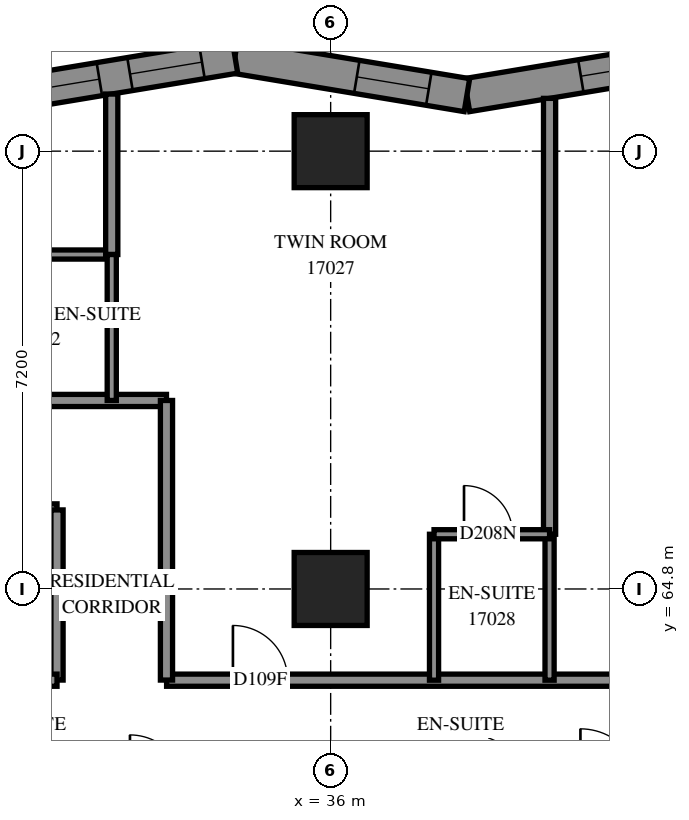
"""IFC4 building model, lengths in metres.
Left out: names, types, materials, properties, quantities, classifications, styles, units other than length and angle.
Written with IfcOpenShell. Run it as: python <this file> out.ifc"""

import sys

from ifc_helpers import new_model, si_unit, direction, frame, frame_2d, origin, origin_2d, place, context, subcontext, project, spatial, polyline, rectangle, outline, extrude, element, fill, save


model = new_model("IFC4")
c1 = context("Model", 3, precision=1e-05, world=origin(), true_north=direction((0.0, 1.0)))
c2 = subcontext(c1, "Body", "Model", "MODEL_VIEW")
j1 = project(units=[si_unit("LENGTHUNIT", "METRE"), si_unit("PLANEANGLEUNIT", "RADIAN")], contexts=[c1])
p1 = place(None, origin())
s1 = spatial("IfcSite", under=j1, at=p1, CompositionType="ELEMENT")
p2 = place(p1, origin())
s2 = spatial("IfcBuilding", under=s1, at=p2, CompositionType="ELEMENT")
p3 = place(p2, frame((0.0, 0.0, 64.4)))
s3 = spatial("IfcBuildingStorey", under=s2, at=p3, CompositionType="ELEMENT", Elevation=64.4)
for number, where, z_axis, x_axis in (
    (1, (36.0, 64.8, 0.0), (0.0, 0.0, 1.0), (1.0, 0.0, 0.0)),
    (2, (36.0, 72.0, 0.0), (0.0, 0.0, 1.0), (1.0, 0.0, 0.0)),
):
    element("IfcColumn", number, at=place(p3, frame(where, z_axis=z_axis, x_axis=x_axis)), inside=s3, PredefinedType="COLUMN", context=c2, shape_type="SweptSolid", body=[
        extrude(rectangle(XDim=1.2, YDim=1.2, at=origin_2d()), origin(), (0.0, 0.0, 1.0), 3.1),
    ])
p4 = place(p3, frame((42.056, 73.554, 0.0), z_axis=(0.0, 0.0, 1.0), x_axis=(-0.9865110911, -0.1636944324, 0.0)))
e3 = element("IfcWall", 3, at=p4, inside=s3, PredefinedType="SOLIDWALL", context=c2, shape_type="SweptSolid", body=[
    extrude(outline(polyline([(-0.046, -0.275), (3.821, -0.275), (3.913, 0.275), (0.046, 0.275), (-0.046, -0.275)])), origin(), (0.0, 0.0, 1.0), 3.1),
])
p5 = place(p4, frame((0.767, 0.0, 0.5)))
e4 = element("IfcOpeningElement", 4, at=p5, cuts=e3, PredefinedType="OPENING", context=c2, shape_type="SweptSolid", body=[
    extrude(rectangle(XDim=1.2, YDim=2.45, at=frame_2d((0.6, 1.225))), frame((0.0, 0.285, 0.0), z_axis=(0.0, -1.0, 0.0), x_axis=(1.0, 0.0, 0.0)), (0.0, 0.0, 1.0), 0.57),
])
p6 = place(p3, frame((38.241, 72.921, 0.0), z_axis=(0.0, 0.0, 1.0), x_axis=(-0.9865110911, 0.1636944324, 0.0)))
e5 = element("IfcWall", 5, at=p6, inside=s3, PredefinedType="SOLIDWALL", context=c2, shape_type="SweptSolid", body=[
    extrude(outline(polyline([(0.046, -0.275), (3.913, -0.275), (3.821, 0.275), (-0.046, 0.275), (0.046, -0.275)])), origin(), (0.0, 0.0, 1.0), 3.1),
])
p7 = place(p6, frame((0.636, 0.0, 0.5)))
e6 = element("IfcOpeningElement", 6, at=p7, cuts=e5, PredefinedType="OPENING", context=c2, shape_type="SweptSolid", body=[
    extrude(rectangle(XDim=1.2, YDim=2.45, at=frame_2d((0.6, 1.225))), frame((0.0, 0.285, 0.0), z_axis=(0.0, -1.0, 0.0), x_axis=(1.0, 0.0, 0.0)), (0.0, 0.0, 1.0), 0.57),
])
p8 = place(p3, frame((34.426, 73.554, 0.0), z_axis=(0.0, 0.0, 1.0), x_axis=(-0.9865103981, -0.1636986085, 0.0)))
e7 = element("IfcWall", 7, at=p8, inside=s3, PredefinedType="SOLIDWALL", context=c2, shape_type="SweptSolid", body=[
    extrude(outline(polyline([(-0.046, -0.275), (3.821, -0.275), (3.913, 0.275), (0.046, 0.275), (-0.046, -0.275)])), origin(), (0.0, 0.0, 1.0), 3.1),
])
p9 = place(p8, frame((0.55, 0.0, 0.5)))
e8 = element("IfcOpeningElement", 8, at=p9, cuts=e7, PredefinedType="OPENING", context=c2, shape_type="SweptSolid", body=[
    extrude(rectangle(XDim=1.2, YDim=2.45, at=frame_2d((0.6, 1.225))), frame((0.0, 0.285, 0.0), z_axis=(0.0, -1.0, 0.0), x_axis=(1.0, 0.0, 0.0)), (0.0, 0.0, 1.0), 0.57),
])
p10 = place(p8, frame((2.26, 0.0, 0.5)))
e9 = element("IfcOpeningElement", 9, at=p10, cuts=e7, PredefinedType="OPENING", context=c2, shape_type="SweptSolid", body=[
    extrude(rectangle(XDim=1.2, YDim=2.45, at=frame_2d((0.6, 1.225))), frame((0.0, 0.285, 0.0), z_axis=(0.0, -1.0, 0.0), x_axis=(1.0, 0.0, 0.0)), (0.0, 0.0, 1.0), 0.57),
])
p11 = place(p3, frame((33.302, 63.3, 0.0), z_axis=(0.0, 0.0, 1.0), x_axis=(1.0, 0.0, 0.0)))
e10 = element("IfcWall", 10, at=p11, inside=s3, PredefinedType="PARTITIONING", context=c2, shape_type="SweptSolid", body=[
    extrude(rectangle(XDim=21.798, YDim=0.2, at=frame_2d((10.899, 0.0))), origin(), (0.0, 0.0, 1.0), 3.1),
])
p12 = place(p11, frame((1.091, 0.0, 0.0)))
e11 = element("IfcOpeningElement", 11, at=p12, cuts=e10, PredefinedType="OPENING", context=c2, shape_type="SweptSolid", body=[
    extrude(rectangle(XDim=0.9, YDim=2.1, at=frame_2d((0.45, 1.05))), frame((0.0, 0.11, 0.0), z_axis=(0.0, -1.0, 0.0), x_axis=(1.0, 0.0, 0.0)), (0.0, 0.0, 1.0), 0.22),
])
p13 = place(p11, frame((8.248, 0.0, 0.0)))
e12 = element("IfcOpeningElement", 12, at=p13, cuts=e10, PredefinedType="OPENING", context=c2, shape_type="SweptSolid", body=[
    extrude(rectangle(XDim=0.9, YDim=2.1, at=frame_2d((0.45, 1.05))), frame((0.0, 0.11, 0.0), z_axis=(0.0, -1.0, 0.0), x_axis=(1.0, 0.0, 0.0)), (0.0, 0.0, 1.0), 0.22),
])
p14 = place(p11, frame((15.448, 0.0, 0.0)))
e13 = element("IfcOpeningElement", 13, at=p14, cuts=e10, PredefinedType="OPENING", context=c2, shape_type="SweptSolid", body=[
    extrude(rectangle(XDim=0.9, YDim=2.1, at=frame_2d((0.45, 1.05))), frame((0.0, 0.11, 0.0), z_axis=(0.0, -1.0, 0.0), x_axis=(1.0, 0.0, 0.0)), (0.0, 0.0, 1.0), 0.22),
])
p15 = place(p3, frame((21.602, 67.9, 0.0), z_axis=(0.0, 0.0, 1.0), x_axis=(1.0, 0.0, 0.0)))
e14 = element("IfcWall", 14, at=p15, inside=s3, PredefinedType="PARTITIONING", context=c2, shape_type="SweptSolid", body=[
    extrude(rectangle(XDim=11.698, YDim=0.2, at=frame_2d((5.849, 0.0))), origin(), (0.0, 0.0, 1.0), 3.1),
])
p16 = place(p15, frame((5.955, 0.0, 0.0)))
e15 = element("IfcOpeningElement", 15, at=p16, cuts=e14, PredefinedType="OPENING", context=c2, shape_type="SweptSolid", body=[
    extrude(rectangle(XDim=0.9, YDim=2.1, at=frame_2d((0.45, 1.05))), frame((0.0, 0.11, 0.0), z_axis=(0.0, -1.0, 0.0), x_axis=(1.0, 0.0, 0.0)), (0.0, 0.0, 1.0), 0.22),
])
p17 = place(p3, frame((21.6, 66.1, 0.0), z_axis=(0.0, 0.0, 1.0), x_axis=(1.0, 0.0, 0.0)))
e16 = element("IfcWall", 16, at=p17, inside=s3, PredefinedType="PARTITIONING", context=c2, shape_type="SweptSolid", body=[
    extrude(rectangle(XDim=9.9, YDim=0.2, at=frame_2d((4.95, 0.0))), origin(), (0.0, 0.0, 1.0), 3.1),
])
p18 = place(p17, frame((5.314, 0.0, 0.0)))
e17 = element("IfcOpeningElement", 17, at=p18, cuts=e16, PredefinedType="OPENING", context=c2, shape_type="SweptSolid", body=[
    extrude(rectangle(XDim=1.0, YDim=2.1, at=frame_2d((0.5, 1.05))), frame((0.0, 0.11, 0.0), z_axis=(0.0, -1.0, 0.0), x_axis=(1.0, 0.0, 0.0)), (0.0, 0.0, 1.0), 0.22),
])
p19 = place(p3, frame((39.6, 65.7, 0.0), z_axis=(0.0, 0.0, 1.0), x_axis=(0.0, 1.0, 0.0)))
e18 = element("IfcWall", 18, at=p19, inside=s3, PredefinedType="PARTITIONING", context=c2, shape_type="SweptSolid", body=[
    extrude(rectangle(XDim=7.168, YDim=0.2, at=frame_2d((3.584, 0.0))), origin(), (0.0, 0.0, 1.0), 3.1),
])
p20 = place(p3, frame((33.3, 63.302, 0.0), z_axis=(0.0, 0.0, 1.0), x_axis=(0.0, 1.0, 0.0)))
e19 = element("IfcWall", 19, at=p20, inside=s3, PredefinedType="PARTITIONING", context=c2, shape_type="SweptSolid", body=[
    extrude(rectangle(XDim=4.598, YDim=0.2, at=frame_2d((2.299, 0.0))), origin(), (0.0, 0.0, 1.0), 3.1),
])
p21 = place(p3, frame((29.2, 70.3, 0.0), z_axis=(0.0, 0.0, 1.0), x_axis=(1.0, 0.0, 0.0)))
e20 = element("IfcWall", 20, at=p21, inside=s3, PredefinedType="PARTITIONING", context=c2, shape_type="SweptSolid", body=[
    extrude(rectangle(XDim=3.2, YDim=0.15, at=frame_2d((1.6, 0.0))), origin(), (0.0, 0.0, 1.0), 3.1),
])
p22 = place(p21, frame((1.204, 0.0, 0.0)))
e21 = element("IfcOpeningElement", 21, at=p22, cuts=e20, PredefinedType="OPENING", context=c2, shape_type="SweptSolid", body=[
    extrude(rectangle(XDim=0.8, YDim=2.1, at=frame_2d((0.4, 1.05))), frame((0.0, 0.085, 0.0), z_axis=(0.0, -1.0, 0.0), x_axis=(1.0, 0.0, 0.0)), (0.0, 0.0, 1.0), 0.17),
])
p23 = place(p3, frame((31.5, 63.302, 0.0), z_axis=(0.0, 0.0, 1.0), x_axis=(0.0, 1.0, 0.0)))
e22 = element("IfcWall", 22, at=p23, inside=s3, PredefinedType="PARTITIONING", context=c2, shape_type="SweptSolid", body=[
    extrude(rectangle(XDim=2.798, YDim=0.2, at=frame_2d((1.399, 0.0))), origin(), (0.0, 0.0, 1.0), 3.1),
])
p24 = place(p3, frame((28.802, 63.3, 0.0), z_axis=(0.0, 0.0, 1.0), x_axis=(1.0, 0.0, 0.0)))
e23 = element("IfcWall", 23, at=p24, inside=s3, PredefinedType="PARTITIONING", context=c2, shape_type="SweptSolid", body=[
    extrude(rectangle(XDim=2.698, YDim=0.2, at=frame_2d((1.349, 0.0))), origin(), (0.0, 0.0, 1.0), 3.1),
])
p25 = place(p3, frame((32.4, 70.3, 0.0), z_axis=(0.0, 0.0, 1.0), x_axis=(0.0, 1.0, 0.0)))
e24 = element("IfcWall", 24, at=p25, inside=s3, PredefinedType="PARTITIONING", context=c2, shape_type="SweptSolid", body=[
    extrude(rectangle(XDim=2.639, YDim=0.2, at=frame_2d((1.32, 0.0))), origin(), (0.0, 0.0, 1.0), 3.1),
])
for number, where, z_axis, x_axis in (
    (25, (37.7, 63.3, 0.0), (0.0, 0.0, 1.0), (0.0, 1.0, 0.0)),
    (26, (39.6, 63.3, 0.0), (0.0, 0.0, 1.0), (0.0, 1.0, 0.0)),
    (27, (32.4, 67.9, 0.0), (0.0, 0.0, 1.0), (0.0, 1.0, 0.0)),
):
    element("IfcWall", number, at=place(p3, frame(where, z_axis=z_axis, x_axis=x_axis)), inside=s3, PredefinedType="PARTITIONING", context=c2, shape_type="SweptSolid", body=[
        extrude(rectangle(XDim=2.4, YDim=0.15, at=frame_2d((1.2, 0.0))), origin(), (0.0, 0.0, 1.0), 3.1),
    ])
p26 = place(p3, frame((37.7, 65.7, 0.0), z_axis=(0.0, 0.0, 1.0), x_axis=(1.0, 0.0, 0.0)))
e28 = element("IfcWall", 28, at=p26, inside=s3, PredefinedType="PARTITIONING", context=c2, shape_type="SweptSolid", body=[
    extrude(rectangle(XDim=1.9, YDim=0.15, at=frame_2d((0.95, 0.0))), origin(), (0.0, 0.0, 1.0), 3.1),
])
p27 = place(p26, frame((0.493, 0.0, 0.0)))
e29 = element("IfcOpeningElement", 29, at=p27, cuts=e28, PredefinedType="OPENING", context=c2, shape_type="SweptSolid", body=[
    extrude(rectangle(XDim=0.8, YDim=2.1, at=frame_2d((0.4, 1.05))), frame((0.0, 0.085, 0.0), z_axis=(0.0, -1.0, 0.0), x_axis=(1.0, 0.0, 0.0)), (0.0, 0.0, 1.0), 0.17),
])
p28 = place(p5, origin())
e30 = element("IfcWindow", 30, at=p28, inside=s3, PartitioningType="SINGLE_PANEL", PredefinedType="WINDOW", context=c2, shape_type="SweptSolid", body=[
    extrude(rectangle(XDim=1.2, YDim=2.45, at=frame_2d((0.6, 1.225))), frame((0.0, 0.155, 0.0), z_axis=(0.0, -1.0, 0.0), x_axis=(1.0, 0.0, 0.0)), (0.0, 0.0, 1.0), 0.06),
])
fill(e4, e30)
p29 = place(p7, origin())
e31 = element("IfcWindow", 31, at=p29, inside=s3, PartitioningType="SINGLE_PANEL", PredefinedType="WINDOW", context=c2, shape_type="SweptSolid", body=[
    extrude(rectangle(XDim=1.2, YDim=2.45, at=frame_2d((0.6, 1.225))), frame((0.0, 0.155, 0.0), z_axis=(0.0, -1.0, 0.0), x_axis=(1.0, 0.0, 0.0)), (0.0, 0.0, 1.0), 0.06),
])
fill(e6, e31)
p30 = place(p9, origin())
e32 = element("IfcWindow", 32, at=p30, inside=s3, PartitioningType="SINGLE_PANEL", PredefinedType="WINDOW", context=c2, shape_type="SweptSolid", body=[
    extrude(rectangle(XDim=1.2, YDim=2.45, at=frame_2d((0.6, 1.225))), frame((0.0, 0.155, 0.0), z_axis=(0.0, -1.0, 0.0), x_axis=(1.0, 0.0, 0.0)), (0.0, 0.0, 1.0), 0.06),
])
fill(e8, e32)
p31 = place(p10, origin())
e33 = element("IfcWindow", 33, at=p31, inside=s3, PartitioningType="SINGLE_PANEL", PredefinedType="WINDOW", context=c2, shape_type="SweptSolid", body=[
    extrude(rectangle(XDim=1.2, YDim=2.45, at=frame_2d((0.6, 1.225))), frame((0.0, 0.155, 0.0), z_axis=(0.0, -1.0, 0.0), x_axis=(1.0, 0.0, 0.0)), (0.0, 0.0, 1.0), 0.06),
])
fill(e9, e33)
p32 = place(p12, origin())
e34 = element("IfcDoor", 34, at=p32, inside=s3, OperationType="SINGLE_SWING_LEFT", PredefinedType="DOOR", context=c2, shape_type="SweptSolid", body=[
    extrude(rectangle(XDim=0.9, YDim=2.1, at=frame_2d((0.45, 1.05))), frame((0.0, 0.025, 0.0), z_axis=(0.0, -1.0, 0.0), x_axis=(1.0, 0.0, 0.0)), (0.0, 0.0, 1.0), 0.05),
])
fill(e11, e34)
p33 = place(p27, origin())
e35 = element("IfcDoor", 35, at=p33, inside=s3, OperationType="SINGLE_SWING_RIGHT", PredefinedType="DOOR", context=c2, shape_type="SweptSolid", body=[
    extrude(rectangle(XDim=0.8, YDim=2.1, at=frame_2d((0.4, 1.05))), frame((0.0, 0.025, 0.0), z_axis=(0.0, -1.0, 0.0), x_axis=(1.0, 0.0, 0.0)), (0.0, 0.0, 1.0), 0.05),
])
fill(e29, e35)
save(model, sys.argv[1])
